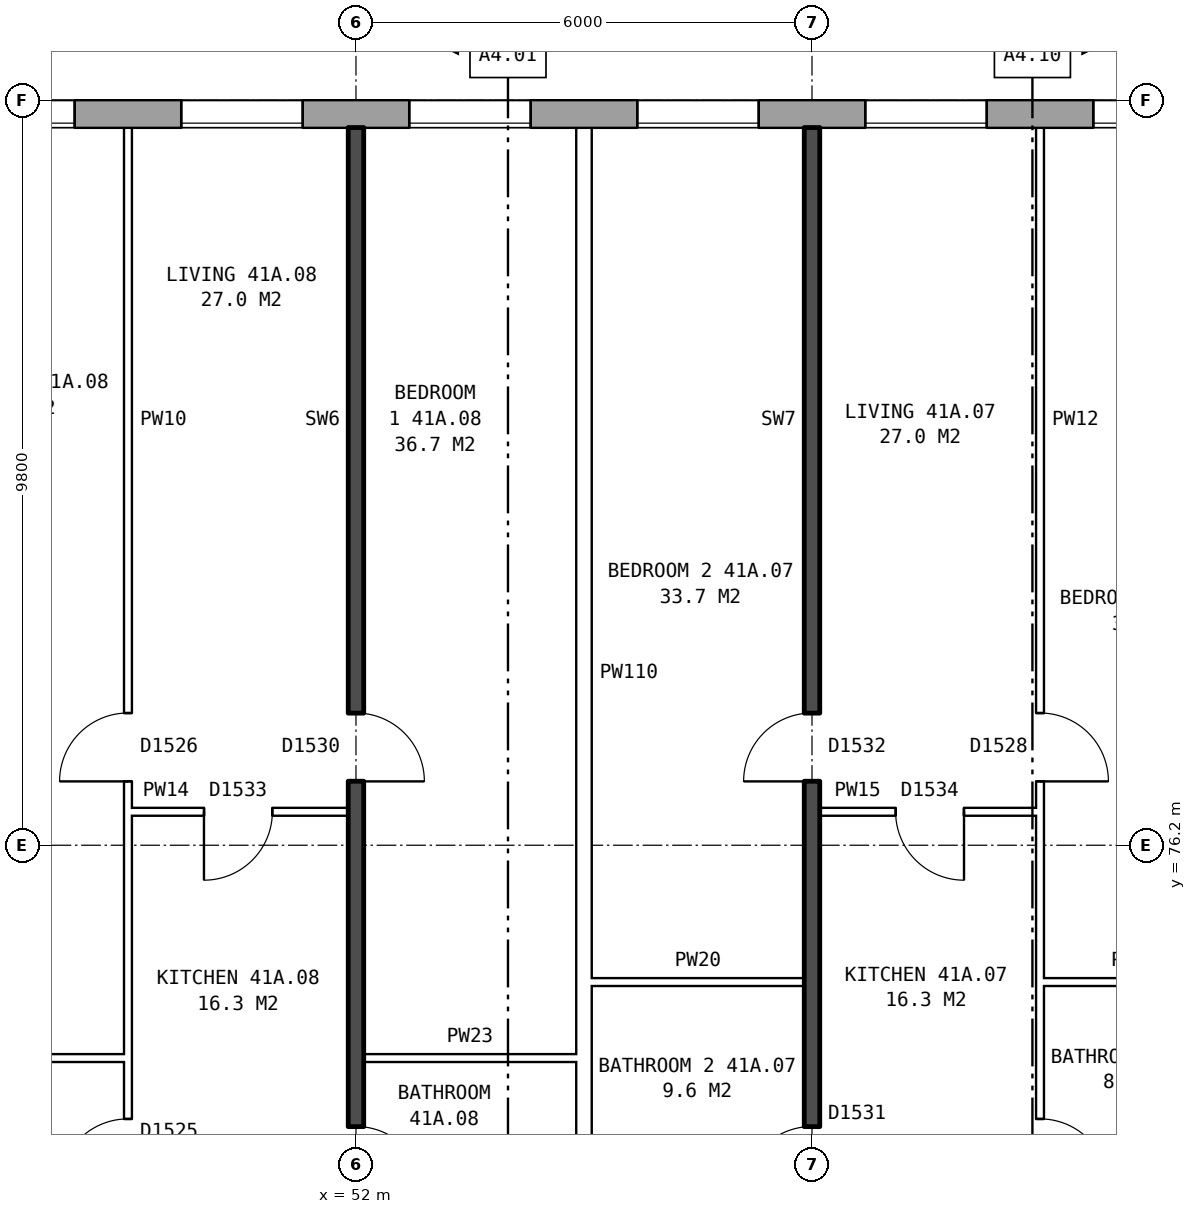
"""IFC4 building model, lengths in metres.
Left out: names, types, materials, properties, quantities, classifications, styles, units other than length and angle.
Written with IfcOpenShell. Run it as: python <this file> out.ifc"""

import sys

from ifc_helpers import new_model, si_unit, direction, frame, frame_2d, origin, place, context, subcontext, project, spatial, rectangle, extrude, element, fill, save


model = new_model("IFC4")
c1 = context("Model", 3, precision=1e-05, world=origin(), true_north=direction((0.0, 1.0)))
c2 = subcontext(c1, "Body", "Model", "MODEL_VIEW")
j1 = project(units=[si_unit("LENGTHUNIT", "METRE"), si_unit("PLANEANGLEUNIT", "RADIAN")], contexts=[c1])
p1 = place(None, origin())
s1 = spatial("IfcSite", under=j1, at=p1, CompositionType="ELEMENT")
p2 = place(p1, origin())
s2 = spatial("IfcBuilding", under=s1, at=p2, CompositionType="ELEMENT")
p3 = place(p2, frame((0.0, 0.0, 148.5)))
s3 = spatial("IfcBuildingStorey", under=s2, at=p3, CompositionType="ELEMENT", Elevation=148.5)
p4 = place(p3, frame((72.925, 85.82, 0.0), z_axis=(0.0, 0.0, 1.0), x_axis=(-1.0, 0.0, 0.0)))
e1 = element("IfcWall", 1, at=p4, inside=s3, PredefinedType="STANDARD", context=c2, shape_type="SweptSolid", body=[
    extrude(rectangle(XDim=41.351, YDim=0.36, at=frame_2d((20.675, 0.0))), origin(), (0.0, 0.0, 1.0), 2.85),
])
p5 = place(p4, frame((0.3, 0.0, 0.8)))
e2 = element("IfcOpeningElement", 2, at=p5, cuts=e1, PredefinedType="OPENING", context=c2, shape_type="SweptSolid", body=[
    extrude(rectangle(XDim=0.8, YDim=0.9, at=frame_2d((0.4, 0.45))), frame((0.0, 0.19, 0.0), z_axis=(0.0, -1.0, 0.0), x_axis=(1.0, 0.0, 0.0)), (0.0, 0.0, 1.0), 0.38),
])
p6 = place(p4, frame((3.625, 0.0, 0.8)))
e3 = element("IfcOpeningElement", 3, at=p6, cuts=e1, PredefinedType="OPENING", context=c2, shape_type="SweptSolid", body=[
    extrude(rectangle(XDim=1.6, YDim=1.8, at=frame_2d((0.8, 0.9))), frame((0.0, 0.19, 0.0), z_axis=(0.0, -1.0, 0.0), x_axis=(1.0, 0.0, 0.0)), (0.0, 0.0, 1.0), 0.38),
])
p7 = place(p4, frame((6.625, 0.0, 0.8)))
e4 = element("IfcOpeningElement", 4, at=p7, cuts=e1, PredefinedType="OPENING", context=c2, shape_type="SweptSolid", body=[
    extrude(rectangle(XDim=1.6, YDim=1.8, at=frame_2d((0.8, 0.9))), frame((0.0, 0.19, 0.0), z_axis=(0.0, -1.0, 0.0), x_axis=(1.0, 0.0, 0.0)), (0.0, 0.0, 1.0), 0.38),
])
p8 = place(p4, frame((9.625, 0.0, 0.8)))
e5 = element("IfcOpeningElement", 5, at=p8, cuts=e1, PredefinedType="OPENING", context=c2, shape_type="SweptSolid", body=[
    extrude(rectangle(XDim=1.6, YDim=1.8, at=frame_2d((0.8, 0.9))), frame((0.0, 0.19, 0.0), z_axis=(0.0, -1.0, 0.0), x_axis=(1.0, 0.0, 0.0)), (0.0, 0.0, 1.0), 0.38),
])
p9 = place(p4, frame((12.625, 0.0, 0.8)))
e6 = element("IfcOpeningElement", 6, at=p9, cuts=e1, PredefinedType="OPENING", context=c2, shape_type="SweptSolid", body=[
    extrude(rectangle(XDim=1.6, YDim=1.8, at=frame_2d((0.8, 0.9))), frame((0.0, 0.19, 0.0), z_axis=(0.0, -1.0, 0.0), x_axis=(1.0, 0.0, 0.0)), (0.0, 0.0, 1.0), 0.38),
])
p10 = place(p4, frame((15.625, 0.0, 0.8)))
e7 = element("IfcOpeningElement", 7, at=p10, cuts=e1, PredefinedType="OPENING", context=c2, shape_type="SweptSolid", body=[
    extrude(rectangle(XDim=1.6, YDim=1.8, at=frame_2d((0.8, 0.9))), frame((0.0, 0.19, 0.0), z_axis=(0.0, -1.0, 0.0), x_axis=(1.0, 0.0, 0.0)), (0.0, 0.0, 1.0), 0.38),
])
p11 = place(p4, frame((18.625, 0.0, 0.8)))
e8 = element("IfcOpeningElement", 8, at=p11, cuts=e1, PredefinedType="OPENING", context=c2, shape_type="SweptSolid", body=[
    extrude(rectangle(XDim=1.6, YDim=1.8, at=frame_2d((0.8, 0.9))), frame((0.0, 0.19, 0.0), z_axis=(0.0, -1.0, 0.0), x_axis=(1.0, 0.0, 0.0)), (0.0, 0.0, 1.0), 0.38),
])
p12 = place(p4, frame((21.625, 0.0, 0.8)))
e9 = element("IfcOpeningElement", 9, at=p12, cuts=e1, PredefinedType="OPENING", context=c2, shape_type="SweptSolid", body=[
    extrude(rectangle(XDim=1.6, YDim=1.8, at=frame_2d((0.8, 0.9))), frame((0.0, 0.19, 0.0), z_axis=(0.0, -1.0, 0.0), x_axis=(1.0, 0.0, 0.0)), (0.0, 0.0, 1.0), 0.38),
])
p13 = place(p4, frame((24.625, 0.0, 0.8)))
e10 = element("IfcOpeningElement", 10, at=p13, cuts=e1, PredefinedType="OPENING", context=c2, shape_type="SweptSolid", body=[
    extrude(rectangle(XDim=1.6, YDim=1.8, at=frame_2d((0.8, 0.9))), frame((0.0, 0.19, 0.0), z_axis=(0.0, -1.0, 0.0), x_axis=(1.0, 0.0, 0.0)), (0.0, 0.0, 1.0), 0.38),
])
p14 = place(p4, frame((27.625, 0.0, 0.8)))
e11 = element("IfcOpeningElement", 11, at=p14, cuts=e1, PredefinedType="OPENING", context=c2, shape_type="SweptSolid", body=[
    extrude(rectangle(XDim=1.6, YDim=1.8, at=frame_2d((0.8, 0.9))), frame((0.0, 0.19, 0.0), z_axis=(0.0, -1.0, 0.0), x_axis=(1.0, 0.0, 0.0)), (0.0, 0.0, 1.0), 0.38),
])
p15 = place(p4, frame((30.625, 0.0, 0.8)))
e12 = element("IfcOpeningElement", 12, at=p15, cuts=e1, PredefinedType="OPENING", context=c2, shape_type="SweptSolid", body=[
    extrude(rectangle(XDim=1.6, YDim=1.8, at=frame_2d((0.8, 0.9))), frame((0.0, 0.19, 0.0), z_axis=(0.0, -1.0, 0.0), x_axis=(1.0, 0.0, 0.0)), (0.0, 0.0, 1.0), 0.38),
])
p16 = place(p4, frame((33.625, 0.0, 0.8)))
e13 = element("IfcOpeningElement", 13, at=p16, cuts=e1, PredefinedType="OPENING", context=c2, shape_type="SweptSolid", body=[
    extrude(rectangle(XDim=1.6, YDim=1.8, at=frame_2d((0.8, 0.9))), frame((0.0, 0.19, 0.0), z_axis=(0.0, -1.0, 0.0), x_axis=(1.0, 0.0, 0.0)), (0.0, 0.0, 1.0), 0.38),
])
p17 = place(p4, frame((36.625, 0.0, 0.8)))
e14 = element("IfcOpeningElement", 14, at=p17, cuts=e1, PredefinedType="OPENING", context=c2, shape_type="SweptSolid", body=[
    extrude(rectangle(XDim=1.6, YDim=1.8, at=frame_2d((0.8, 0.9))), frame((0.0, 0.19, 0.0), z_axis=(0.0, -1.0, 0.0), x_axis=(1.0, 0.0, 0.0)), (0.0, 0.0, 1.0), 0.38),
])
p18 = place(p4, frame((1.4, 0.0, 0.8)))
e15 = element("IfcOpeningElement", 15, at=p18, cuts=e1, PredefinedType="OPENING", context=c2, shape_type="SweptSolid", body=[
    extrude(rectangle(XDim=1.2, YDim=1.8, at=frame_2d((0.6, 0.9))), frame((0.0, 0.19, 0.0), z_axis=(0.0, -1.0, 0.0), x_axis=(1.0, 0.0, 0.0)), (0.0, 0.0, 1.0), 0.38),
])
p19 = place(p3, frame((46.1, 73.4, 0.0), z_axis=(0.0, 0.0, 1.0), x_axis=(1.0, 0.0, 0.0)))
e16 = element("IfcWall", 16, at=p19, inside=s3, PredefinedType="PARTITIONING", context=c2, shape_type="SweptSolid", body=[
    extrude(rectangle(XDim=2.9, YDim=0.1, at=frame_2d((1.45, 0.0))), origin(), (0.0, 0.0, 1.0), 2.85),
])
for number, where, z_axis, x_axis in (
    (17, (52.1, 73.4, 0.0), (0.0, 0.0, 1.0), (1.0, 0.0, 0.0)),
    (18, (55.1, 74.4, 0.0), (0.0, 0.0, 1.0), (1.0, 0.0, 0.0)),
):
    element("IfcWall", number, at=place(p3, frame(where, z_axis=z_axis, x_axis=x_axis)), inside=s3, PredefinedType="PARTITIONING", context=c2, shape_type="SweptSolid", body=[
        extrude(rectangle(XDim=2.8, YDim=0.1, at=frame_2d((1.4, 0.0))), origin(), (0.0, 0.0, 1.0), 2.85),
    ])
p20 = place(p3, frame((61.0, 74.4, 0.0), z_axis=(0.0, 0.0, 1.0), x_axis=(1.0, 0.0, 0.0)))
e19 = element("IfcWall", 19, at=p20, inside=s3, PredefinedType="PARTITIONING", context=c2, shape_type="SweptSolid", body=[
    extrude(rectangle(XDim=2.64, YDim=0.1, at=frame_2d((1.32, 0.0))), origin(), (0.0, 0.0, 1.0), 2.85),
])
p21 = place(p3, frame((49.0, 76.64, 0.0), z_axis=(0.0, 0.0, 1.0), x_axis=(1.0, 0.0, 0.0)))
e20 = element("IfcWall", 20, at=p21, inside=s3, PredefinedType="PARTITIONING", context=c2, shape_type="SweptSolid", body=[
    extrude(rectangle(XDim=2.9, YDim=0.1, at=frame_2d((1.45, 0.0))), origin(), (0.0, 0.0, 1.0), 2.85),
])
p22 = place(p21, frame((1.0, 0.0, 0.0)))
e21 = element("IfcOpeningElement", 21, at=p22, cuts=e20, PredefinedType="OPENING", context=c2, shape_type="SweptSolid", body=[
    extrude(rectangle(XDim=0.9, YDim=2.1, at=frame_2d((0.45, 1.05))), frame((0.0, 0.06, 0.0), z_axis=(0.0, -1.0, 0.0), x_axis=(1.0, 0.0, 0.0)), (0.0, 0.0, 1.0), 0.12),
])
p23 = place(p3, frame((58.1, 76.64, 0.0), z_axis=(0.0, 0.0, 1.0), x_axis=(1.0, 0.0, 0.0)))
e22 = element("IfcWall", 22, at=p23, inside=s3, PredefinedType="PARTITIONING", context=c2, shape_type="SweptSolid", body=[
    extrude(rectangle(XDim=2.9, YDim=0.1, at=frame_2d((1.45, 0.0))), origin(), (0.0, 0.0, 1.0), 2.85),
])
p24 = place(p23, frame((1.0, 0.0, 0.0)))
e23 = element("IfcOpeningElement", 23, at=p24, cuts=e22, PredefinedType="OPENING", context=c2, shape_type="SweptSolid", body=[
    extrude(rectangle(XDim=0.9, YDim=2.1, at=frame_2d((0.45, 1.05))), frame((0.0, 0.06, 0.0), z_axis=(0.0, -1.0, 0.0), x_axis=(1.0, 0.0, 0.0)), (0.0, 0.0, 1.0), 0.12),
])
p25 = place(p3, frame((49.0, 71.3, 0.0), z_axis=(0.0, 0.0, 1.0), x_axis=(0.0, 1.0, 0.0)))
e24 = element("IfcWall", 24, at=p25, inside=s3, PredefinedType="PARTITIONING", context=c2, shape_type="SweptSolid", body=[
    extrude(rectangle(XDim=14.34, YDim=0.1, at=frame_2d((7.17, 0.0))), origin(), (0.0, 0.0, 1.0), 2.85),
])
p26 = place(p25, frame((5.74, 0.0, 0.0)))
e25 = element("IfcOpeningElement", 25, at=p26, cuts=e24, PredefinedType="OPENING", context=c2, shape_type="SweptSolid", body=[
    extrude(rectangle(XDim=0.9, YDim=2.1, at=frame_2d((0.45, 1.05))), frame((0.0, 0.06, 0.0), z_axis=(0.0, -1.0, 0.0), x_axis=(1.0, 0.0, 0.0)), (0.0, 0.0, 1.0), 0.12),
])
p27 = place(p25, frame((0.4, 0.0, 0.0)))
e26 = element("IfcOpeningElement", 26, at=p27, cuts=e24, PredefinedType="OPENING", context=c2, shape_type="SweptSolid", body=[
    extrude(rectangle(XDim=0.9, YDim=2.1, at=frame_2d((0.45, 1.05))), frame((0.0, 0.06, 0.0), z_axis=(0.0, -1.0, 0.0), x_axis=(1.0, 0.0, 0.0)), (0.0, 0.0, 1.0), 0.12),
])
p28 = place(p3, frame((52.0, 71.2, 0.0), z_axis=(0.0, 0.0, 1.0), x_axis=(0.0, 1.0, 0.0)))
e27 = element("IfcWall", 27, at=p28, inside=s3, PredefinedType="SOLIDWALL", context=c2, shape_type="SweptSolid", body=[
    extrude(rectangle(XDim=14.44, YDim=0.2, at=frame_2d((7.22, 0.0))), origin(), (0.0, 0.0, 1.0), 2.85),
])
p29 = place(p28, frame((5.84, 0.0, 0.0)))
e28 = element("IfcOpeningElement", 28, at=p29, cuts=e27, PredefinedType="OPENING", context=c2, shape_type="SweptSolid", body=[
    extrude(rectangle(XDim=0.9, YDim=2.1, at=frame_2d((0.45, 1.05))), frame((0.0, 0.11, 0.0), z_axis=(0.0, -1.0, 0.0), x_axis=(1.0, 0.0, 0.0)), (0.0, 0.0, 1.0), 0.22),
])
p30 = place(p28, frame((0.4, 0.0, 0.0)))
e29 = element("IfcOpeningElement", 29, at=p30, cuts=e27, PredefinedType="OPENING", context=c2, shape_type="SweptSolid", body=[
    extrude(rectangle(XDim=0.9, YDim=2.1, at=frame_2d((0.45, 1.05))), frame((0.0, 0.11, 0.0), z_axis=(0.0, -1.0, 0.0), x_axis=(1.0, 0.0, 0.0)), (0.0, 0.0, 1.0), 0.22),
])
p31 = place(p3, frame((55.0, 71.3, 0.0), z_axis=(0.0, 0.0, 1.0), x_axis=(0.0, 1.0, 0.0)))
e30 = element("IfcWall", 30, at=p31, inside=s3, PredefinedType="PARTITIONING", context=c2, shape_type="SweptSolid", body=[
    extrude(rectangle(XDim=14.34, YDim=0.2, at=frame_2d((7.17, 0.0))), origin(), (0.0, 0.0, 1.0), 2.85),
])
p32 = place(p3, frame((58.0, 71.2, 0.0), z_axis=(0.0, 0.0, 1.0), x_axis=(0.0, 1.0, 0.0)))
e31 = element("IfcWall", 31, at=p32, inside=s3, PredefinedType="SOLIDWALL", context=c2, shape_type="SweptSolid", body=[
    extrude(rectangle(XDim=14.44, YDim=0.2, at=frame_2d((7.22, 0.0))), origin(), (0.0, 0.0, 1.0), 2.85),
])
p33 = place(p32, frame((5.84, 0.0, 0.0)))
e32 = element("IfcOpeningElement", 32, at=p33, cuts=e31, PredefinedType="OPENING", context=c2, shape_type="SweptSolid", body=[
    extrude(rectangle(XDim=0.9, YDim=2.1, at=frame_2d((0.45, 1.05))), frame((0.0, 0.11, 0.0), z_axis=(0.0, -1.0, 0.0), x_axis=(1.0, 0.0, 0.0)), (0.0, 0.0, 1.0), 0.22),
])
p34 = place(p32, frame((0.4, 0.0, 0.0)))
e33 = element("IfcOpeningElement", 33, at=p34, cuts=e31, PredefinedType="OPENING", context=c2, shape_type="SweptSolid", body=[
    extrude(rectangle(XDim=0.9, YDim=2.1, at=frame_2d((0.45, 1.05))), frame((0.0, 0.11, 0.0), z_axis=(0.0, -1.0, 0.0), x_axis=(1.0, 0.0, 0.0)), (0.0, 0.0, 1.0), 0.22),
])
p35 = place(p3, frame((61.0, 71.3, 0.0), z_axis=(0.0, 0.0, 1.0), x_axis=(0.0, 1.0, 0.0)))
e34 = element("IfcWall", 34, at=p35, inside=s3, PredefinedType="PARTITIONING", context=c2, shape_type="SweptSolid", body=[
    extrude(rectangle(XDim=14.34, YDim=0.1, at=frame_2d((7.17, 0.0))), origin(), (0.0, 0.0, 1.0), 2.85),
])
p36 = place(p35, frame((5.74, 0.0, 0.0)))
e35 = element("IfcOpeningElement", 35, at=p36, cuts=e34, PredefinedType="OPENING", context=c2, shape_type="SweptSolid", body=[
    extrude(rectangle(XDim=0.9, YDim=2.1, at=frame_2d((0.45, 1.05))), frame((0.0, 0.06, 0.0), z_axis=(0.0, -1.0, 0.0), x_axis=(1.0, 0.0, 0.0)), (0.0, 0.0, 1.0), 0.12),
])
p37 = place(p35, frame((0.4, 0.0, 0.0)))
e36 = element("IfcOpeningElement", 36, at=p37, cuts=e34, PredefinedType="OPENING", context=c2, shape_type="SweptSolid", body=[
    extrude(rectangle(XDim=0.9, YDim=2.1, at=frame_2d((0.45, 1.05))), frame((0.0, 0.06, 0.0), z_axis=(0.0, -1.0, 0.0), x_axis=(1.0, 0.0, 0.0)), (0.0, 0.0, 1.0), 0.12),
])
p38 = place(p8, origin())
e37 = element("IfcWindow", 37, at=p38, inside=s3, PartitioningType="SINGLE_PANEL", PredefinedType="WINDOW", context=c2, shape_type="SweptSolid", body=[
    extrude(rectangle(XDim=1.6, YDim=1.8, at=frame_2d((0.8, 0.9))), frame((0.0, 0.15, 0.0), z_axis=(0.0, -1.0, 0.0), x_axis=(1.0, 0.0, 0.0)), (0.0, 0.0, 1.0), 0.06),
])
fill(e5, e37)
p39 = place(p9, origin())
e38 = element("IfcWindow", 38, at=p39, inside=s3, PartitioningType="SINGLE_PANEL", PredefinedType="WINDOW", context=c2, shape_type="SweptSolid", body=[
    extrude(rectangle(XDim=1.6, YDim=1.8, at=frame_2d((0.8, 0.9))), frame((0.0, 0.15, 0.0), z_axis=(0.0, -1.0, 0.0), x_axis=(1.0, 0.0, 0.0)), (0.0, 0.0, 1.0), 0.06),
])
fill(e6, e38)
p40 = place(p10, origin())
e39 = element("IfcWindow", 39, at=p40, inside=s3, PartitioningType="SINGLE_PANEL", PredefinedType="WINDOW", context=c2, shape_type="SweptSolid", body=[
    extrude(rectangle(XDim=1.6, YDim=1.8, at=frame_2d((0.8, 0.9))), frame((0.0, 0.15, 0.0), z_axis=(0.0, -1.0, 0.0), x_axis=(1.0, 0.0, 0.0)), (0.0, 0.0, 1.0), 0.06),
])
fill(e7, e39)
p41 = place(p11, origin())
e40 = element("IfcWindow", 40, at=p41, inside=s3, PartitioningType="SINGLE_PANEL", PredefinedType="WINDOW", context=c2, shape_type="SweptSolid", body=[
    extrude(rectangle(XDim=1.6, YDim=1.8, at=frame_2d((0.8, 0.9))), frame((0.0, 0.15, 0.0), z_axis=(0.0, -1.0, 0.0), x_axis=(1.0, 0.0, 0.0)), (0.0, 0.0, 1.0), 0.06),
])
fill(e8, e40)
p42 = place(p12, origin())
e41 = element("IfcWindow", 41, at=p42, inside=s3, PartitioningType="SINGLE_PANEL", PredefinedType="WINDOW", context=c2, shape_type="SweptSolid", body=[
    extrude(rectangle(XDim=1.6, YDim=1.8, at=frame_2d((0.8, 0.9))), frame((0.0, 0.15, 0.0), z_axis=(0.0, -1.0, 0.0), x_axis=(1.0, 0.0, 0.0)), (0.0, 0.0, 1.0), 0.06),
])
fill(e9, e41)
p43 = place(p13, origin())
e42 = element("IfcWindow", 42, at=p43, inside=s3, PartitioningType="SINGLE_PANEL", PredefinedType="WINDOW", context=c2, shape_type="SweptSolid", body=[
    extrude(rectangle(XDim=1.6, YDim=1.8, at=frame_2d((0.8, 0.9))), frame((0.0, 0.15, 0.0), z_axis=(0.0, -1.0, 0.0), x_axis=(1.0, 0.0, 0.0)), (0.0, 0.0, 1.0), 0.06),
])
fill(e10, e42)
p44 = place(p36, frame((0.9, 0.0, 0.0), z_axis=(0.0, 0.0, 1.0), x_axis=(-1.0, 0.0, 0.0)))
e43 = element("IfcDoor", 43, at=p44, inside=s3, OperationType="SINGLE_SWING_RIGHT", PredefinedType="DOOR", context=c2, shape_type="SweptSolid", body=[
    extrude(rectangle(XDim=0.9, YDim=2.1, at=frame_2d((0.45, 1.05))), frame((0.0, 0.025, 0.0), z_axis=(0.0, -1.0, 0.0), x_axis=(1.0, 0.0, 0.0)), (0.0, 0.0, 1.0), 0.05),
])
fill(e35, e43)
p45 = place(p33, origin())
e44 = element("IfcDoor", 44, at=p45, inside=s3, OperationType="SINGLE_SWING_LEFT", PredefinedType="DOOR", context=c2, shape_type="SweptSolid", body=[
    extrude(rectangle(XDim=0.9, YDim=2.1, at=frame_2d((0.45, 1.05))), frame((0.0, 0.025, 0.0), z_axis=(0.0, -1.0, 0.0), x_axis=(1.0, 0.0, 0.0)), (0.0, 0.0, 1.0), 0.05),
])
fill(e32, e44)
p46 = place(p24, frame((0.9, 0.0, 0.0), z_axis=(0.0, 0.0, 1.0), x_axis=(-1.0, 0.0, 0.0)))
e45 = element("IfcDoor", 45, at=p46, inside=s3, OperationType="SINGLE_SWING_LEFT", PredefinedType="DOOR", context=c2, shape_type="SweptSolid", body=[
    extrude(rectangle(XDim=0.9, YDim=2.1, at=frame_2d((0.45, 1.05))), frame((0.0, 0.025, 0.0), z_axis=(0.0, -1.0, 0.0), x_axis=(1.0, 0.0, 0.0)), (0.0, 0.0, 1.0), 0.05),
])
fill(e23, e45)
p47 = place(p37, frame((0.9, 0.0, 0.0), z_axis=(0.0, 0.0, 1.0), x_axis=(-1.0, 0.0, 0.0)))
e46 = element("IfcDoor", 46, at=p47, inside=s3, OperationType="SINGLE_SWING_RIGHT", PredefinedType="DOOR", context=c2, shape_type="SweptSolid", body=[
    extrude(rectangle(XDim=0.9, YDim=2.1, at=frame_2d((0.45, 1.05))), frame((0.0, 0.025, 0.0), z_axis=(0.0, -1.0, 0.0), x_axis=(1.0, 0.0, 0.0)), (0.0, 0.0, 1.0), 0.05),
])
fill(e36, e46)
p48 = place(p34, origin())
e47 = element("IfcDoor", 47, at=p48, inside=s3, OperationType="SINGLE_SWING_LEFT", PredefinedType="DOOR", context=c2, shape_type="SweptSolid", body=[
    extrude(rectangle(XDim=0.9, YDim=2.1, at=frame_2d((0.45, 1.05))), frame((0.0, 0.025, 0.0), z_axis=(0.0, -1.0, 0.0), x_axis=(1.0, 0.0, 0.0)), (0.0, 0.0, 1.0), 0.05),
])
fill(e33, e47)
p49 = place(p29, frame((0.9, 0.0, 0.0), z_axis=(0.0, 0.0, 1.0), x_axis=(-1.0, 0.0, 0.0)))
e48 = element("IfcDoor", 48, at=p49, inside=s3, OperationType="SINGLE_SWING_RIGHT", PredefinedType="DOOR", context=c2, shape_type="SweptSolid", body=[
    extrude(rectangle(XDim=0.9, YDim=2.1, at=frame_2d((0.45, 1.05))), frame((0.0, 0.025, 0.0), z_axis=(0.0, -1.0, 0.0), x_axis=(1.0, 0.0, 0.0)), (0.0, 0.0, 1.0), 0.05),
])
fill(e28, e48)
p50 = place(p26, origin())
e49 = element("IfcDoor", 49, at=p50, inside=s3, OperationType="SINGLE_SWING_LEFT", PredefinedType="DOOR", context=c2, shape_type="SweptSolid", body=[
    extrude(rectangle(XDim=0.9, YDim=2.1, at=frame_2d((0.45, 1.05))), frame((0.0, 0.025, 0.0), z_axis=(0.0, -1.0, 0.0), x_axis=(1.0, 0.0, 0.0)), (0.0, 0.0, 1.0), 0.05),
])
fill(e25, e49)
p51 = place(p22, frame((0.9, 0.0, 0.0), z_axis=(0.0, 0.0, 1.0), x_axis=(-1.0, 0.0, 0.0)))
e50 = element("IfcDoor", 50, at=p51, inside=s3, OperationType="SINGLE_SWING_RIGHT", PredefinedType="DOOR", context=c2, shape_type="SweptSolid", body=[
    extrude(rectangle(XDim=0.9, YDim=2.1, at=frame_2d((0.45, 1.05))), frame((0.0, 0.025, 0.0), z_axis=(0.0, -1.0, 0.0), x_axis=(1.0, 0.0, 0.0)), (0.0, 0.0, 1.0), 0.05),
])
fill(e21, e50)
p52 = place(p30, frame((0.9, 0.0, 0.0), z_axis=(0.0, 0.0, 1.0), x_axis=(-1.0, 0.0, 0.0)))
e51 = element("IfcDoor", 51, at=p52, inside=s3, OperationType="SINGLE_SWING_RIGHT", PredefinedType="DOOR", context=c2, shape_type="SweptSolid", body=[
    extrude(rectangle(XDim=0.9, YDim=2.1, at=frame_2d((0.45, 1.05))), frame((0.0, 0.025, 0.0), z_axis=(0.0, -1.0, 0.0), x_axis=(1.0, 0.0, 0.0)), (0.0, 0.0, 1.0), 0.05),
])
fill(e29, e51)
p53 = place(p27, origin())
e52 = element("IfcDoor", 52, at=p53, inside=s3, OperationType="SINGLE_SWING_LEFT", PredefinedType="DOOR", context=c2, shape_type="SweptSolid", body=[
    extrude(rectangle(XDim=0.9, YDim=2.1, at=frame_2d((0.45, 1.05))), frame((0.0, 0.025, 0.0), z_axis=(0.0, -1.0, 0.0), x_axis=(1.0, 0.0, 0.0)), (0.0, 0.0, 1.0), 0.05),
])
fill(e26, e52)
save(model, sys.argv[1])
